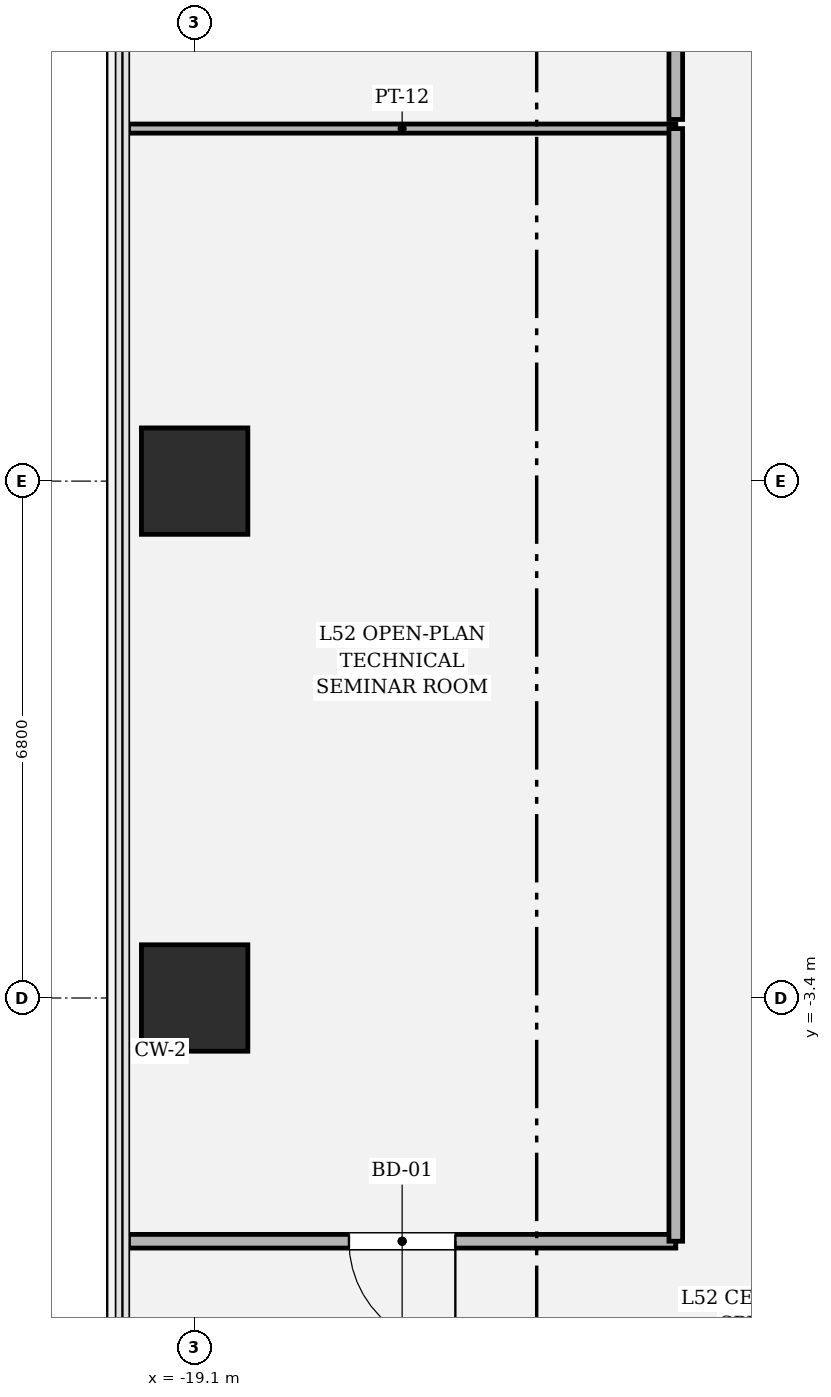
"""IFC4 building model, lengths in metres.
Left out: names, types, materials, properties, quantities, classifications, styles, units other than length and angle.
Written with IfcOpenShell. Run it as: python <this file> out.ifc"""

import sys

from ifc_helpers import new_model, si_unit, direction, frame, frame_2d, origin, origin_2d, place, context, subcontext, project, spatial, rectangle, hollow_rectangle, extrude, element, fill, save


model = new_model("IFC4")
c1 = context("Model", 3, precision=1e-05, world=origin(), true_north=direction((0.0, 1.0)))
c2 = subcontext(c1, "Body", "Model", "MODEL_VIEW")
j1 = project(units=[si_unit("LENGTHUNIT", "METRE"), si_unit("PLANEANGLEUNIT", "RADIAN")], contexts=[c1])
p1 = place(None, origin())
s1 = spatial("IfcSite", under=j1, at=p1, CompositionType="ELEMENT")
p2 = place(p1, origin())
s2 = spatial("IfcBuilding", under=s1, at=p2, CompositionType="ELEMENT")
p3 = place(p2, frame((0.0, 0.0, 220.8)))
s3 = spatial("IfcBuildingStorey", under=s2, at=p3, CompositionType="ELEMENT", Elevation=220.8)
for number, where, z_axis, x_axis in (
    (1, (-19.1, 3.4, 0.0), (0.0, 0.0, 1.0), (1.0, 0.0, 0.0)),
    (2, (-19.1, -3.4, 0.0), (0.0, 0.0, 1.0), (1.0, 0.0, 0.0)),
):
    element("IfcColumn", number, at=place(p3, frame(where, z_axis=z_axis, x_axis=x_axis)), inside=s3, PredefinedType="COLUMN", context=c2, shape_type="SweptSolid", body=[
        extrude(hollow_rectangle(XDim=1.4, YDim=1.4, WallThickness=0.042, at=origin_2d()), origin(), (0.0, 0.0, 1.0), 4.05),
    ])
p4 = place(p3, frame((-12.77, -6.6, 0.0), z_axis=(0.0, 0.0, 1.0), x_axis=(-1.0, 0.0, 0.0)))
e3 = element("IfcWall", 3, at=p4, inside=s3, PredefinedType="PARTITIONING", context=c2, shape_type="SweptSolid", body=[
    extrude(rectangle(XDim=7.2, YDim=0.18, at=frame_2d((3.6, 0.0))), origin(), (0.0, 0.0, 1.0), 3.174),
])
p5 = place(p4, frame((2.9, 0.0, 0.0)))
e4 = element("IfcOpeningElement", 4, at=p5, cuts=e3, PredefinedType="OPENING", context=c2, shape_type="SweptSolid", body=[
    extrude(rectangle(XDim=1.4, YDim=2.25, at=frame_2d((0.7, 1.125))), frame((0.0, 0.1, 0.0), z_axis=(0.0, -1.0, 0.0), x_axis=(1.0, 0.0, 0.0)), (0.0, 0.0, 1.0), 0.2),
])
p6 = place(p3, frame((-19.97, 8.038, 0.0), z_axis=(0.0, 0.0, 1.0), x_axis=(1.0, 0.0, 0.0)))
e5 = element("IfcWall", 5, at=p6, inside=s3, PredefinedType="PARTITIONING", context=c2, shape_type="SweptSolid", body=[
    extrude(rectangle(XDim=7.2, YDim=0.12, at=frame_2d((3.6, 0.0))), origin(), (0.0, 0.0, 1.0), 3.174),
])
p7 = place(p3, frame((-12.77, 8.038, 0.0), z_axis=(0.0, 0.0, 1.0), x_axis=(0.0, -1.0, 0.0)))
e6 = element("IfcWall", 6, at=p7, inside=s3, PredefinedType="PARTITIONING", context=c2, shape_type="SweptSolid", body=[
    extrude(rectangle(XDim=14.638, YDim=0.18, at=frame_2d((7.319, 0.0))), origin(), (0.0, 0.0, 1.0), 3.174),
])
p8 = place(p3, frame((-12.77, 18.37, 0.0), z_axis=(0.0, 0.0, 1.0), x_axis=(0.0, -1.0, 0.0)))
e7 = element("IfcWall", 7, at=p8, inside=s3, PredefinedType="PARTITIONING", context=c2, shape_type="SweptSolid", body=[
    extrude(rectangle(XDim=10.212, YDim=0.18, at=frame_2d((5.106, 0.0))), origin(), (0.0, 0.0, 1.0), 3.174),
])
p9 = place(p8, frame((6.831, 0.0, 0.0)))
e8 = element("IfcOpeningElement", 8, at=p9, cuts=e7, PredefinedType="OPENING", context=c2, shape_type="SweptSolid", body=[
    extrude(rectangle(XDim=1.05, YDim=2.2, at=frame_2d((0.525, 1.1))), frame((0.0, 0.1, 0.0), z_axis=(0.0, -1.0, 0.0), x_axis=(1.0, 0.0, 0.0)), (0.0, 0.0, 1.0), 0.2),
])
p10 = place(p5, origin())
e9 = element("IfcDoor", 9, at=p10, inside=s3, OperationType="SINGLE_SWING_LEFT", PredefinedType="DOOR", context=c2, shape_type="SweptSolid", body=[
    extrude(rectangle(XDim=1.4, YDim=2.25, at=frame_2d((0.7, 1.125))), frame((0.0, 0.025, 0.0), z_axis=(0.0, -1.0, 0.0), x_axis=(1.0, 0.0, 0.0)), (0.0, 0.0, 1.0), 0.05),
])
fill(e4, e9)
save(model, sys.argv[1])
